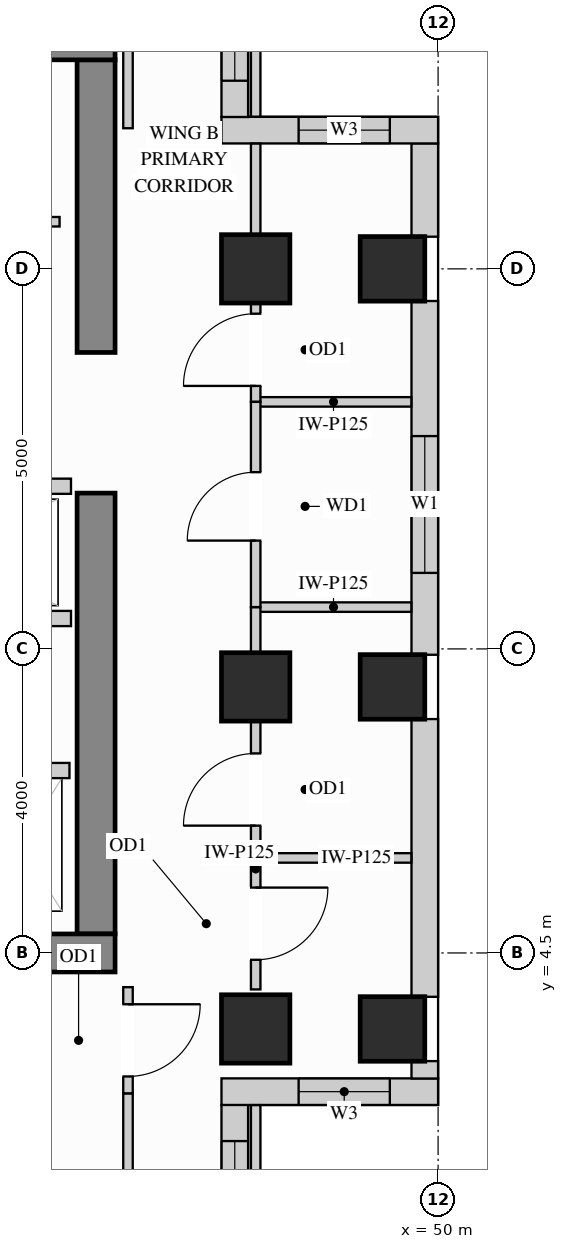
"""IFC4 building model, lengths in metres.
Left out: names, types, materials, properties, quantities, classifications, styles, units other than length and angle.
Written with IfcOpenShell. Run it as: python <this file> out.ifc"""

import sys

from ifc_helpers import new_model, si_unit, direction, frame, frame_2d, origin, origin_2d, place, context, subcontext, project, spatial, rectangle, extrude, source, transform, mapped, element, fill, save


model = new_model("IFC4")
c1 = context("Model", 3, precision=1e-05, world=origin(), true_north=direction((0.0, 1.0)))
c2 = subcontext(c1, "Body", "Model", "MODEL_VIEW")
j1 = project(units=[si_unit("LENGTHUNIT", "METRE"), si_unit("PLANEANGLEUNIT", "RADIAN")], contexts=[c1])
p1 = place(None, origin())
s1 = spatial("IfcSite", under=j1, at=p1, CompositionType="ELEMENT")
p2 = place(p1, origin())
s2 = spatial("IfcBuilding", under=s1, at=p2, CompositionType="ELEMENT")
p3 = place(p2, frame((0.0, 0.0, 237.6)))
s3 = spatial("IfcBuildingStorey", under=s2, at=p3, CompositionType="ELEMENT", Elevation=237.6)
m1 = source(origin(), c2, "Body", "SweptSolid", [
    extrude(rectangle(XDim=0.9, YDim=0.9, at=origin_2d()), origin(), (0.0, 0.0, 1.0), 3.4),
])
for number, where, z_axis, x_axis in (
    (1, (47.6, 13.5, 0.0), (0.0, 0.0, 1.0), (1.0, 0.0, 0.0)),
    (2, (47.6, 3.5, 0.0), (0.0, 0.0, 1.0), (1.0, 0.0, 0.0)),
    (3, (47.6, 8.0, 0.0), (0.0, 0.0, 1.0), (1.0, 0.0, 0.0)),
):
    element("IfcColumn", number, at=place(p3, frame(where, z_axis=z_axis, x_axis=x_axis)), inside=s3, PredefinedType="COLUMN", context=c2, shape_type="MappedRepresentation", body=[
        mapped(m1, transform((0.0, 0.0, 0.0), x_axis=(1.0, 0.0, 0.0), y_axis=(0.0, 1.0, 0.0), z_axis=(0.0, 0.0, 1.0))),
    ])
m2 = source(origin(), c2, "Body", "SweptSolid", [
    extrude(rectangle(XDim=0.85, YDim=0.85, at=origin_2d()), origin(), (0.0, 0.0, 1.0), 3.4),
])
for number, where, z_axis, x_axis in (
    (4, (49.4, 13.5, 0.0), (0.0, 0.0, 1.0), (1.0, 0.0, 0.0)),
    (5, (49.4, 3.5, 0.0), (0.0, 0.0, 1.0), (1.0, 0.0, 0.0)),
    (6, (49.4, 8.0, 0.0), (0.0, 0.0, 1.0), (1.0, 0.0, 0.0)),
):
    element("IfcColumn", number, at=place(p3, frame(where, z_axis=z_axis, x_axis=x_axis)), inside=s3, PredefinedType="COLUMN", context=c2, shape_type="MappedRepresentation", body=[
        mapped(m2, transform((0.0, 0.0, 0.0), x_axis=(1.0, 0.0, 0.0), y_axis=(0.0, 1.0, 0.0), z_axis=(0.0, 0.0, 1.0))),
    ])
m3 = source(origin(), c2, "Body", "SweptSolid", [
    extrude(rectangle(XDim=5.8, YDim=0.5, at=frame_2d((2.9, 0.0))), origin(), (0.0, 0.0, 1.0), 3.4),
])
p4 = place(p3, frame((45.5, 4.75, 0.0), z_axis=(0.0, 0.0, 1.0), x_axis=(0.0, 1.0, 0.0)))
e7 = element("IfcWall", 7, at=p4, inside=s3, PredefinedType="SHEAR", context=c2, shape_type="MappedRepresentation", body=[
    mapped(m3, transform((0.0, 0.0, 0.0), x_axis=(1.0, 0.0, 0.0), y_axis=(0.0, 1.0, 0.0), z_axis=(0.0, 0.0, 1.0))),
])
m4 = source(origin(), c2, "Body", "SweptSolid", [
    extrude(rectangle(XDim=3.85, YDim=0.5, at=frame_2d((1.925, 0.0))), origin(), (0.0, 0.0, 1.0), 3.4),
])
p5 = place(p3, frame((45.5, 12.4, 0.0), z_axis=(0.0, 0.0, 1.0), x_axis=(0.0, 1.0, 0.0)))
e8 = element("IfcWall", 8, at=p5, inside=s3, PredefinedType="SHEAR", context=c2, shape_type="MappedRepresentation", body=[
    mapped(m4, transform((0.0, 0.0, 0.0), x_axis=(1.0, 0.0, 0.0), y_axis=(0.0, 1.0, 0.0), z_axis=(0.0, 0.0, 1.0))),
])
m5 = source(origin(), c2, "Body", "SweptSolid", [
    extrude(rectangle(XDim=10.0, YDim=0.5, at=frame_2d((5.0, 0.0))), origin(), (0.0, 0.0, 1.0), 3.4),
])
for number, where, z_axis, x_axis in (
    (9, (35.75, 16.5, 0.0), (0.0, 0.0, 1.0), (1.0, 0.0, 0.0)),
    (10, (35.75, 4.5, 0.0), (0.0, 0.0, 1.0), (1.0, 0.0, 0.0)),
):
    element("IfcWall", number, at=place(p3, frame(where, z_axis=z_axis, x_axis=x_axis)), inside=s3, PredefinedType="SHEAR", context=c2, shape_type="MappedRepresentation", body=[
        mapped(m5, transform((0.0, 0.0, 0.0), x_axis=(1.0, 0.0, 0.0), y_axis=(0.0, 1.0, 0.0), z_axis=(0.0, 0.0, 1.0))),
    ])
p6 = place(p3, frame((47.325, 0.348, 0.0), z_axis=(0.0, 0.0, 1.0), x_axis=(0.0, 1.0, 0.0)))
e11 = element("IfcWall", 11, at=p6, inside=s3, PredefinedType="SOLIDWALL", context=c2, shape_type="SweptSolid", body=[
    extrude(rectangle(XDim=2.154, YDim=0.35, at=frame_2d((1.077, 0.0))), origin(), (0.0, 0.0, 1.0), 3.385),
])
p7 = place(p6, frame((0.477, 0.0, 0.78)))
e12 = element("IfcOpeningElement", 12, at=p7, cuts=e11, PredefinedType="OPENING", context=c2, shape_type="SweptSolid", body=[
    extrude(rectangle(XDim=1.2, YDim=2.1, at=frame_2d((0.6, 1.05))), frame((0.0, 0.185, 0.0), z_axis=(0.0, -1.0, 0.0), x_axis=(1.0, 0.0, 0.0)), (0.0, 0.0, 1.0), 0.37),
])
p8 = place(p3, frame((47.15, 2.675, 0.0), z_axis=(0.0, 0.0, 1.0), x_axis=(1.0, 0.0, 0.0)))
e13 = element("IfcWall", 13, at=p8, inside=s3, PredefinedType="SOLIDWALL", context=c2, shape_type="SweptSolid", body=[
    extrude(rectangle(XDim=2.85, YDim=0.35, at=frame_2d((1.425, 0.0))), origin(), (0.0, 0.0, 1.0), 3.385),
])
p9 = place(p8, frame((1.015, 0.0, 0.78)))
e14 = element("IfcOpeningElement", 14, at=p9, cuts=e13, PredefinedType="OPENING", context=c2, shape_type="SweptSolid", body=[
    extrude(rectangle(XDim=1.2, YDim=2.1, at=frame_2d((0.6, 1.05))), frame((0.0, 0.185, 0.0), z_axis=(0.0, -1.0, 0.0), x_axis=(1.0, 0.0, 0.0)), (0.0, 0.0, 1.0), 0.37),
])
m6 = source(origin(), c2, "Body", "SweptSolid", [
    extrude(rectangle(XDim=0.229, YDim=0.35, at=frame_2d((0.115, 0.0))), origin(), (0.0, 0.0, 1.0), 3.385),
])
p10 = place(p3, frame((49.825, 2.848, 0.0), z_axis=(0.0, 0.0, 1.0), x_axis=(0.0, 1.0, 0.0)))
e15 = element("IfcWall", 15, at=p10, inside=s3, PredefinedType="SOLIDWALL", context=c2, shape_type="MappedRepresentation", body=[
    mapped(m6, transform((0.0, 0.0, 0.0), x_axis=(1.0, 0.0, 0.0), y_axis=(0.0, 1.0, 0.0), z_axis=(0.0, 0.0, 1.0))),
])
m7 = source(origin(), c2, "Body", "SweptSolid", [
    extrude(rectangle(XDim=3.654, YDim=0.35, at=frame_2d((1.827, 0.0))), origin(), (0.0, 0.0, 1.0), 3.385),
])
p11 = place(p3, frame((49.825, 3.923, 0.0), z_axis=(0.0, 0.0, 1.0), x_axis=(0.0, 1.0, 0.0)))
e16 = element("IfcWall", 16, at=p11, inside=s3, PredefinedType="SOLIDWALL", context=c2, shape_type="MappedRepresentation", body=[
    mapped(m7, transform((0.0, 0.0, 0.0), x_axis=(1.0, 0.0, 0.0), y_axis=(0.0, 1.0, 0.0), z_axis=(0.0, 0.0, 1.0))),
])
p12 = place(p3, frame((49.825, 8.423, 0.0), z_axis=(0.0, 0.0, 1.0), x_axis=(0.0, 1.0, 0.0)))
e17 = element("IfcWall", 17, at=p12, inside=s3, PredefinedType="SOLIDWALL", context=c2, shape_type="SweptSolid", body=[
    extrude(rectangle(XDim=4.654, YDim=0.35, at=frame_2d((2.327, 0.0))), origin(), (0.0, 0.0, 1.0), 3.385),
])
p13 = place(p12, frame((1.077, 0.0, 0.78)))
e18 = element("IfcOpeningElement", 18, at=p13, cuts=e17, PredefinedType="OPENING", context=c2, shape_type="SweptSolid", body=[
    extrude(rectangle(XDim=1.8, YDim=2.1, at=frame_2d((0.9, 1.05))), frame((0.0, 0.185, 0.0), z_axis=(0.0, -1.0, 0.0), x_axis=(1.0, 0.0, 0.0)), (0.0, 0.0, 1.0), 0.37),
])
m8 = source(origin(), c2, "Body", "SweptSolid", [
    extrude(rectangle(XDim=1.229, YDim=0.35, at=frame_2d((0.615, 0.0))), origin(), (0.0, 0.0, 1.0), 3.385),
])
p14 = place(p3, frame((49.825, 13.923, 0.0), z_axis=(0.0, 0.0, 1.0), x_axis=(0.0, 1.0, 0.0)))
e19 = element("IfcWall", 19, at=p14, inside=s3, PredefinedType="SOLIDWALL", context=c2, shape_type="MappedRepresentation", body=[
    mapped(m8, transform((0.0, 0.0, 0.0), x_axis=(1.0, 0.0, 0.0), y_axis=(0.0, 1.0, 0.0), z_axis=(0.0, 0.0, 1.0))),
])
p15 = place(p3, frame((50.0, 15.325, 0.0), z_axis=(0.0, 0.0, 1.0), x_axis=(-1.0, 0.0, 0.0)))
e20 = element("IfcWall", 20, at=p15, inside=s3, PredefinedType="SOLIDWALL", context=c2, shape_type="SweptSolid", body=[
    extrude(rectangle(XDim=2.85, YDim=0.35, at=frame_2d((1.425, 0.0))), origin(), (0.0, 0.0, 1.0), 3.385),
])
p16 = place(p15, frame((0.635, 0.0, 0.78)))
e21 = element("IfcOpeningElement", 21, at=p16, cuts=e20, PredefinedType="OPENING", context=c2, shape_type="SweptSolid", body=[
    extrude(rectangle(XDim=1.2, YDim=2.1, at=frame_2d((0.6, 1.05))), frame((0.0, 0.185, 0.0), z_axis=(0.0, -1.0, 0.0), x_axis=(1.0, 0.0, 0.0)), (0.0, 0.0, 1.0), 0.37),
])
p17 = place(p3, frame((47.325, 15.498, 0.0), z_axis=(0.0, 0.0, 1.0), x_axis=(0.0, 1.0, 0.0)))
e22 = element("IfcWall", 22, at=p17, inside=s3, PredefinedType="SOLIDWALL", context=c2, shape_type="SweptSolid", body=[
    extrude(rectangle(XDim=2.154, YDim=0.35, at=frame_2d((1.077, 0.0))), origin(), (0.0, 0.0, 1.0), 3.385),
])
p18 = place(p17, frame((0.477, 0.0, 0.78)))
e23 = element("IfcOpeningElement", 23, at=p18, cuts=e22, PredefinedType="OPENING", context=c2, shape_type="SweptSolid", body=[
    extrude(rectangle(XDim=1.2, YDim=2.1, at=frame_2d((0.6, 1.05))), frame((0.0, 0.185, 0.0), z_axis=(0.0, -1.0, 0.0), x_axis=(1.0, 0.0, 0.0)), (0.0, 0.0, 1.0), 0.37),
])
p19 = place(p3, frame((40.75, 14.12, 0.0), z_axis=(0.0, 0.0, 1.0), x_axis=(1.0, 0.0, 0.0)))
e24 = element("IfcWall", 24, at=p19, inside=s3, PredefinedType="PARTITIONING", context=c2, shape_type="SweptSolid", body=[
    extrude(rectangle(XDim=4.27, YDim=0.125, at=frame_2d((2.135, 0.0))), origin(), (0.0, 0.0, 1.0), 3.385),
])
p20 = place(p19, frame((1.66, 0.0, 0.0)))
e25 = element("IfcOpeningElement", 25, at=p20, cuts=e24, PredefinedType="OPENING", context=c2, shape_type="SweptSolid", body=[
    extrude(rectangle(XDim=0.95, YDim=2.15, at=frame_2d((0.475, 1.075))), frame((0.0, 0.073, 0.0), z_axis=(0.0, -1.0, 0.0), x_axis=(1.0, 0.0, 0.0)), (0.0, 0.0, 1.0), 0.145),
])
m9 = source(origin(), c2, "Body", "SweptSolid", [
    extrude(rectangle(XDim=2.048, YDim=0.125, at=frame_2d((1.024, 0.0))), origin(), (0.0, 0.0, 1.0), 2.916),
])
p21 = place(p3, frame((47.6, 11.75, 0.0), z_axis=(0.0, 0.0, 1.0), x_axis=(1.0, 0.0, 0.0)))
e26 = element("IfcWall", 26, at=p21, inside=s3, PredefinedType="PARTITIONING", context=c2, shape_type="MappedRepresentation", body=[
    mapped(m9, transform((0.0, 0.0, 0.0), x_axis=(1.0, 0.0, 0.0), y_axis=(0.0, 1.0, 0.0), z_axis=(0.0, 0.0, 1.0))),
])
m10 = source(origin(), c2, "Body", "SweptSolid", [
    extrude(rectangle(XDim=2.048, YDim=0.125, at=frame_2d((1.024, 0.0))), origin(), (0.0, 0.0, 1.0), 3.385),
])
for number, where, z_axis, x_axis in (
    (27, (47.6, 5.75, 0.0), (0.0, 0.0, 1.0), (1.0, 0.0, 0.0)),
    (28, (47.6, 9.05, 0.0), (0.0, 0.0, 1.0), (1.0, 0.0, 0.0)),
):
    element("IfcWall", number, at=place(p3, frame(where, z_axis=z_axis, x_axis=x_axis)), inside=s3, PredefinedType="PARTITIONING", context=c2, shape_type="MappedRepresentation", body=[
        mapped(m10, transform((0.0, 0.0, 0.0), x_axis=(1.0, 0.0, 0.0), y_axis=(0.0, 1.0, 0.0), z_axis=(0.0, 0.0, 1.0))),
    ])
p22 = place(p3, frame((47.6, 4.02, 0.0), z_axis=(0.0, 0.0, 1.0), x_axis=(0.0, 1.0, 0.0)))
e29 = element("IfcWall", 29, at=p22, inside=s3, PredefinedType="PARTITIONING", context=c2, shape_type="SweptSolid", body=[
    extrude(rectangle(XDim=1.73, YDim=0.125, at=frame_2d((0.865, 0.0))), origin(), (0.0, 0.0, 1.0), 2.773),
])
p23 = place(p22, frame((0.39, 0.0, 0.0)))
e30 = element("IfcOpeningElement", 30, at=p23, cuts=e29, PredefinedType="OPENING", context=c2, shape_type="SweptSolid", body=[
    extrude(rectangle(XDim=0.95, YDim=2.15, at=frame_2d((0.475, 1.075))), frame((0.0, 0.073, 0.0), z_axis=(0.0, -1.0, 0.0), x_axis=(1.0, 0.0, 0.0)), (0.0, 0.0, 1.0), 0.145),
])
m11 = source(origin(), c2, "Body", "SweptSolid", [
    extrude(rectangle(XDim=2.148, YDim=0.125, at=frame_2d((1.074, 0.0))), origin(), (0.0, 0.0, 1.0), 3.385),
])
p24 = place(p3, frame((47.6, 0.35, 0.0), z_axis=(0.0, 0.0, 1.0), x_axis=(0.0, 1.0, 0.0)))
e31 = element("IfcWall", 31, at=p24, inside=s3, PredefinedType="PARTITIONING", context=c2, shape_type="MappedRepresentation", body=[
    mapped(m11, transform((0.0, 0.0, 0.0), x_axis=(1.0, 0.0, 0.0), y_axis=(0.0, 1.0, 0.0), z_axis=(0.0, 0.0, 1.0))),
])
p25 = place(p3, frame((47.6, 5.75, 0.0), z_axis=(0.0, 0.0, 1.0), x_axis=(0.0, 1.0, 0.0)))
e32 = element("IfcWall", 32, at=p25, inside=s3, PredefinedType="PARTITIONING", context=c2, shape_type="SweptSolid", body=[
    extrude(rectangle(XDim=1.8, YDim=0.125, at=frame_2d((0.9, 0.0))), origin(), (0.0, 0.0, 1.0), 2.773),
])
p26 = place(p25, frame((0.425, 0.0, 0.0)))
e33 = element("IfcOpeningElement", 33, at=p26, cuts=e32, PredefinedType="OPENING", context=c2, shape_type="SweptSolid", body=[
    extrude(rectangle(XDim=0.95, YDim=2.15, at=frame_2d((0.475, 1.075))), frame((0.0, 0.073, 0.0), z_axis=(0.0, -1.0, 0.0), x_axis=(1.0, 0.0, 0.0)), (0.0, 0.0, 1.0), 0.145),
])
m12 = source(origin(), c2, "Body", "SweptSolid", [
    extrude(rectangle(XDim=0.6, YDim=0.125, at=frame_2d((0.3, 0.0))), origin(), (0.0, 0.0, 1.0), 2.773),
])
p27 = place(p3, frame((47.6, 8.45, 0.0), z_axis=(0.0, 0.0, 1.0), x_axis=(0.0, 1.0, 0.0)))
e34 = element("IfcWall", 34, at=p27, inside=s3, PredefinedType="PARTITIONING", context=c2, shape_type="MappedRepresentation", body=[
    mapped(m12, transform((0.0, 0.0, 0.0), x_axis=(1.0, 0.0, 0.0), y_axis=(0.0, 1.0, 0.0), z_axis=(0.0, 0.0, 1.0))),
])
p28 = place(p3, frame((47.6, 11.75, 0.0), z_axis=(0.0, 0.0, 1.0), x_axis=(0.0, 1.0, 0.0)))
e35 = element("IfcWall", 35, at=p28, inside=s3, PredefinedType="PARTITIONING", context=c2, shape_type="SweptSolid", body=[
    extrude(rectangle(XDim=1.3, YDim=0.125, at=frame_2d((0.65, 0.0))), origin(), (0.0, 0.0, 1.0), 2.773),
])
p29 = place(p28, frame((0.21, 0.0, 0.0)))
e36 = element("IfcOpeningElement", 36, at=p29, cuts=e35, PredefinedType="OPENING", context=c2, shape_type="SweptSolid", body=[
    extrude(rectangle(XDim=0.95, YDim=2.15, at=frame_2d((0.475, 1.075))), frame((0.0, 0.073, 0.0), z_axis=(0.0, -1.0, 0.0), x_axis=(1.0, 0.0, 0.0)), (0.0, 0.0, 1.0), 0.145),
])
m13 = source(origin(), c2, "Body", "SweptSolid", [
    extrude(rectangle(XDim=1.198, YDim=0.125, at=frame_2d((0.599, 0.0))), origin(), (0.0, 0.0, 1.0), 3.385),
])
p30 = place(p3, frame((47.6, 13.95, 0.0), z_axis=(0.0, 0.0, 1.0), x_axis=(0.0, 1.0, 0.0)))
e37 = element("IfcWall", 37, at=p30, inside=s3, PredefinedType="PARTITIONING", context=c2, shape_type="MappedRepresentation", body=[
    mapped(m13, transform((0.0, 0.0, 0.0), x_axis=(1.0, 0.0, 0.0), y_axis=(0.0, 1.0, 0.0), z_axis=(0.0, 0.0, 1.0))),
])
p31 = place(p3, frame((47.6, 15.502, 0.0), z_axis=(0.0, 0.0, 1.0), x_axis=(0.0, 1.0, 0.0)))
e38 = element("IfcWall", 38, at=p31, inside=s3, PredefinedType="PARTITIONING", context=c2, shape_type="MappedRepresentation", body=[
    mapped(m11, transform((0.0, 0.0, 0.0), x_axis=(1.0, 0.0, 0.0), y_axis=(0.0, 1.0, 0.0), z_axis=(0.0, 0.0, 1.0))),
])
p32 = place(p3, frame((47.6, 9.05, 0.0), z_axis=(0.0, 0.0, 1.0), x_axis=(0.0, 1.0, 0.0)))
e39 = element("IfcWall", 39, at=p32, inside=s3, PredefinedType="PARTITIONING", context=c2, shape_type="SweptSolid", body=[
    extrude(rectangle(XDim=2.7, YDim=0.125, at=frame_2d((1.35, 0.0))), origin(), (0.0, 0.0, 1.0), 2.773),
])
p33 = place(p32, frame((0.875, 0.0, 0.0)))
e40 = element("IfcOpeningElement", 40, at=p33, cuts=e39, PredefinedType="OPENING", context=c2, shape_type="SweptSolid", body=[
    extrude(rectangle(XDim=0.9, YDim=2.15, at=frame_2d((0.45, 1.075))), frame((0.0, 0.073, 0.0), z_axis=(0.0, -1.0, 0.0), x_axis=(1.0, 0.0, 0.0)), (0.0, 0.0, 1.0), 0.145),
])
m14 = source(origin(), c2, "Body", "SweptSolid", [
    extrude(rectangle(XDim=2.298, YDim=0.125, at=frame_2d((1.149, 0.0))), origin(), (0.0, 0.0, 1.0), 3.385),
])
p34 = place(p3, frame((45.92, 15.35, 0.0), z_axis=(0.0, 0.0, 1.0), x_axis=(0.0, 1.0, 0.0)))
e41 = element("IfcWall", 41, at=p34, inside=s3, PredefinedType="PARTITIONING", context=c2, shape_type="MappedRepresentation", body=[
    mapped(m14, transform((0.0, 0.0, 0.0), x_axis=(1.0, 0.0, 0.0), y_axis=(0.0, 1.0, 0.0), z_axis=(0.0, 0.0, 1.0))),
])
p35 = place(p3, frame((45.92, 2.65, 0.0), z_axis=(0.0, 0.0, 1.0), x_axis=(0.0, 1.0, 0.0)))
e42 = element("IfcWall", 42, at=p35, inside=s3, PredefinedType="PARTITIONING", context=c2, shape_type="SweptSolid", body=[
    extrude(rectangle(XDim=1.4, YDim=0.125, at=frame_2d((0.7, 0.0))), origin(), (0.0, 0.0, 1.0), 3.385),
])
p36 = place(p35, frame((0.225, 0.0, 0.0)))
e43 = element("IfcOpeningElement", 43, at=p36, cuts=e42, PredefinedType="OPENING", context=c2, shape_type="SweptSolid", body=[
    extrude(rectangle(XDim=0.95, YDim=2.15, at=frame_2d((0.475, 1.075))), frame((0.0, 0.073, 0.0), z_axis=(0.0, -1.0, 0.0), x_axis=(1.0, 0.0, 0.0)), (0.0, 0.0, 1.0), 0.145),
])
p37 = place(p3, frame((45.92, 0.352, 0.0), z_axis=(0.0, 0.0, 1.0), x_axis=(0.0, 1.0, 0.0)))
e44 = element("IfcWall", 44, at=p37, inside=s3, PredefinedType="PARTITIONING", context=c2, shape_type="MappedRepresentation", body=[
    mapped(m14, transform((0.0, 0.0, 0.0), x_axis=(1.0, 0.0, 0.0), y_axis=(0.0, 1.0, 0.0), z_axis=(0.0, 0.0, 1.0))),
])
m15 = source(origin(), c2, "Body", "SweptSolid", [
    extrude(rectangle(XDim=1.3, YDim=0.2, at=frame_2d((0.65, 0.0))), origin(), (0.0, 0.0, 1.0), 3.385),
])
p38 = place(p3, frame((43.85, 6.9, 0.0), z_axis=(0.0, 0.0, 1.0), x_axis=(1.0, 0.0, 0.0)))
e45 = element("IfcWall", 45, at=p38, inside=s3, PredefinedType="PARTITIONING", context=c2, shape_type="MappedRepresentation", body=[
    mapped(m15, transform((0.0, 0.0, 0.0), x_axis=(1.0, 0.0, 0.0), y_axis=(0.0, 1.0, 0.0), z_axis=(0.0, 0.0, 1.0))),
])
m16 = source(origin(), c2, "Body", "SweptSolid", [
    extrude(rectangle(XDim=3.49, YDim=0.2, at=frame_2d((1.745, 0.0))), origin(), (0.0, 0.0, 1.0), 3.385),
])
for number, where, z_axis, x_axis in (
    (46, (41.68, 10.64, 0.0), (0.0, 0.0, 1.0), (1.0, 0.0, 0.0)),
    (47, (41.68, 8.9, 0.0), (0.0, 0.0, 1.0), (1.0, 0.0, 0.0)),
):
    element("IfcWall", number, at=place(p3, frame(where, z_axis=z_axis, x_axis=x_axis)), inside=s3, PredefinedType="PARTITIONING", context=c2, shape_type="MappedRepresentation", body=[
        mapped(m16, transform((0.0, 0.0, 0.0), x_axis=(1.0, 0.0, 0.0), y_axis=(0.0, 1.0, 0.0), z_axis=(0.0, 0.0, 1.0))),
    ])
m17 = source(origin(), c2, "Body", "SweptSolid", [
    extrude(rectangle(XDim=0.95, YDim=2.15, at=frame_2d((0.475, 1.075))), frame((0.0, 0.025, 0.0), z_axis=(0.0, -1.0, 0.0), x_axis=(1.0, 0.0, 0.0)), (0.0, 0.0, 1.0), 0.05),
])
p39 = place(p36, origin())
e48 = element("IfcDoor", 48, at=p39, inside=s3, OperationType="SINGLE_SWING_RIGHT", PredefinedType="DOOR", context=c2, shape_type="MappedRepresentation", body=[
    mapped(m17, transform((0.0, 0.0, 0.0), x_axis=(1.0, 0.0, 0.0), y_axis=(0.0, 1.0, 0.0), z_axis=(0.0, 0.0, 1.0))),
])
fill(e43, e48)
p40 = place(p23, origin())
e49 = element("IfcDoor", 49, at=p40, inside=s3, OperationType="SINGLE_SWING_RIGHT", PredefinedType="DOOR", context=c2, shape_type="MappedRepresentation", body=[
    mapped(m17, transform((0.0, 0.0, 0.0), x_axis=(1.0, 0.0, 0.0), y_axis=(0.0, 1.0, 0.0), z_axis=(0.0, 0.0, 1.0))),
])
fill(e30, e49)
p41 = place(p26, origin())
e50 = element("IfcDoor", 50, at=p41, inside=s3, OperationType="SINGLE_SWING_LEFT", PredefinedType="DOOR", context=c2, shape_type="MappedRepresentation", body=[
    mapped(m17, transform((0.0, 0.0, 0.0), x_axis=(1.0, 0.0, 0.0), y_axis=(0.0, 1.0, 0.0), z_axis=(0.0, 0.0, 1.0))),
])
fill(e33, e50)
p42 = place(p29, origin())
e51 = element("IfcDoor", 51, at=p42, inside=s3, OperationType="SINGLE_SWING_LEFT", PredefinedType="DOOR", context=c2, shape_type="MappedRepresentation", body=[
    mapped(m17, transform((0.0, 0.0, 0.0), x_axis=(1.0, 0.0, 0.0), y_axis=(0.0, 1.0, 0.0), z_axis=(0.0, 0.0, 1.0))),
])
fill(e36, e51)
m18 = source(origin(), c2, "Body", "SweptSolid", [
    extrude(rectangle(XDim=0.9, YDim=2.15, at=frame_2d((0.45, 1.075))), frame((0.0, 0.025, 0.0), z_axis=(0.0, -1.0, 0.0), x_axis=(1.0, 0.0, 0.0)), (0.0, 0.0, 1.0), 0.05),
])
p43 = place(p33, origin())
e52 = element("IfcDoor", 52, at=p43, inside=s3, OperationType="SINGLE_SWING_LEFT", PredefinedType="DOOR", context=c2, shape_type="MappedRepresentation", body=[
    mapped(m18, transform((0.0, 0.0, 0.0), x_axis=(1.0, 0.0, 0.0), y_axis=(0.0, 1.0, 0.0), z_axis=(0.0, 0.0, 1.0))),
])
fill(e40, e52)
m19 = source(origin(), c2, "Body", "SweptSolid", [
    extrude(rectangle(XDim=1.8, YDim=2.1, at=frame_2d((0.9, 1.05))), frame((0.0, 0.03, 0.0), z_axis=(0.0, -1.0, 0.0), x_axis=(1.0, 0.0, 0.0)), (0.0, 0.0, 1.0), 0.06),
])
p44 = place(p13, origin())
e53 = element("IfcWindow", 53, at=p44, inside=s3, PartitioningType="SINGLE_PANEL", PredefinedType="WINDOW", context=c2, shape_type="MappedRepresentation", body=[
    mapped(m19, transform((0.0, 0.0, 0.0), x_axis=(1.0, 0.0, 0.0), y_axis=(0.0, 1.0, 0.0), z_axis=(0.0, 0.0, 1.0))),
])
fill(e18, e53)
m20 = source(origin(), c2, "Body", "SweptSolid", [
    extrude(rectangle(XDim=1.2, YDim=2.1, at=frame_2d((0.6, 1.05))), frame((0.0, 0.03, 0.0), z_axis=(0.0, -1.0, 0.0), x_axis=(1.0, 0.0, 0.0)), (0.0, 0.0, 1.0), 0.06),
])
p45 = place(p7, origin())
e54 = element("IfcWindow", 54, at=p45, inside=s3, PartitioningType="SINGLE_PANEL", PredefinedType="WINDOW", context=c2, shape_type="MappedRepresentation", body=[
    mapped(m20, transform((0.0, 0.0, 0.0), x_axis=(1.0, 0.0, 0.0), y_axis=(0.0, 1.0, 0.0), z_axis=(0.0, 0.0, 1.0))),
])
fill(e12, e54)
p46 = place(p9, origin())
e55 = element("IfcWindow", 55, at=p46, inside=s3, PartitioningType="SINGLE_PANEL", PredefinedType="WINDOW", context=c2, shape_type="MappedRepresentation", body=[
    mapped(m20, transform((0.0, 0.0, 0.0), x_axis=(1.0, 0.0, 0.0), y_axis=(0.0, 1.0, 0.0), z_axis=(0.0, 0.0, 1.0))),
])
fill(e14, e55)
p47 = place(p16, origin())
e56 = element("IfcWindow", 56, at=p47, inside=s3, PartitioningType="SINGLE_PANEL", PredefinedType="WINDOW", context=c2, shape_type="MappedRepresentation", body=[
    mapped(m20, transform((0.0, 0.0, 0.0), x_axis=(1.0, 0.0, 0.0), y_axis=(0.0, 1.0, 0.0), z_axis=(0.0, 0.0, 1.0))),
])
fill(e21, e56)
p48 = place(p18, origin())
e57 = element("IfcWindow", 57, at=p48, inside=s3, PartitioningType="SINGLE_PANEL", PredefinedType="WINDOW", context=c2, shape_type="MappedRepresentation", body=[
    mapped(m20, transform((0.0, 0.0, 0.0), x_axis=(1.0, 0.0, 0.0), y_axis=(0.0, 1.0, 0.0), z_axis=(0.0, 0.0, 1.0))),
])
fill(e23, e57)
save(model, sys.argv[1])
